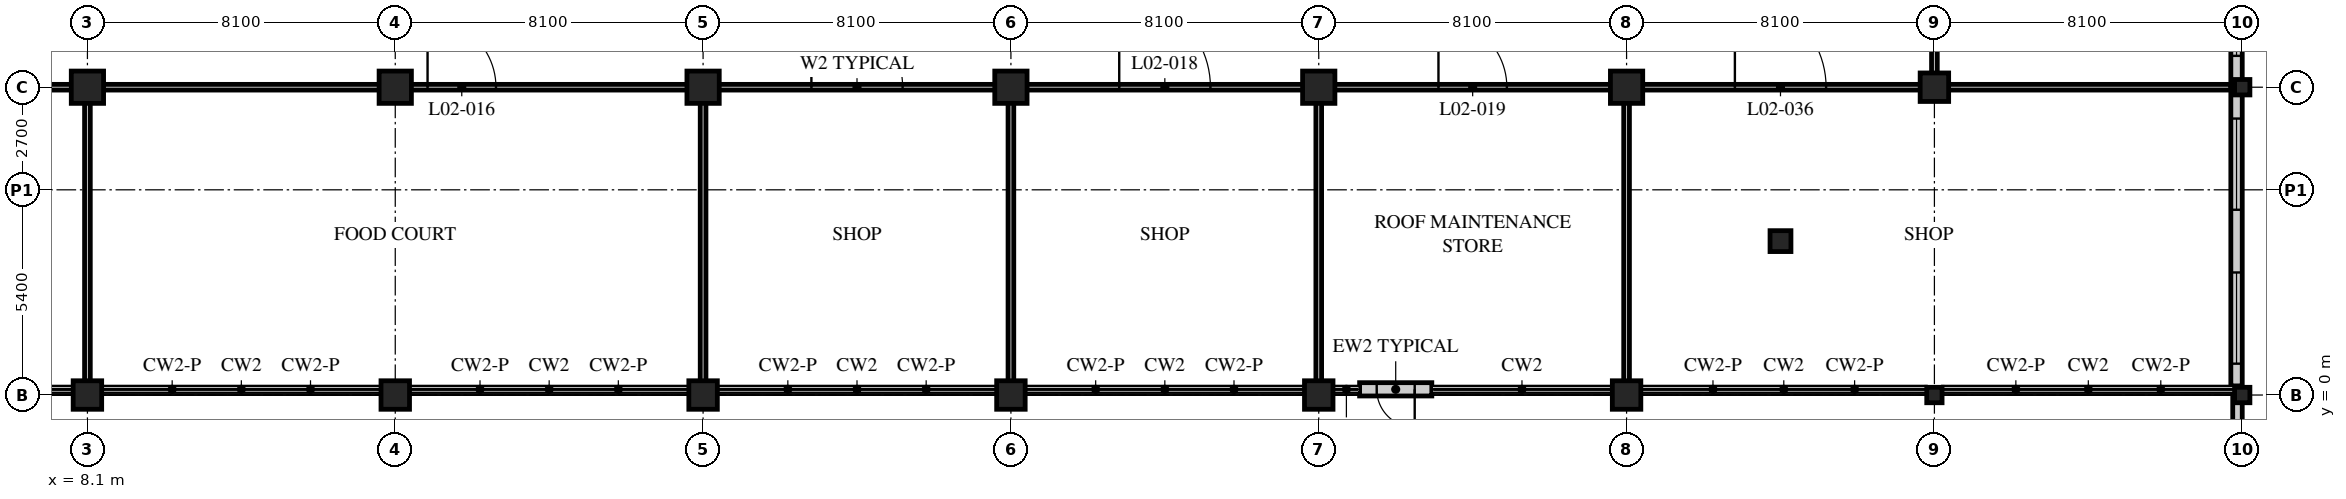
"""IFC4 building model, lengths in metres.
Left out: names, types, materials, properties, quantities, classifications, styles, units other than length and angle.
Written with IfcOpenShell. Run it as: python <this file> out.ifc"""

import sys

from ifc_helpers import new_model, si_unit, direction, frame, frame_2d, origin, origin_2d, place, context, subcontext, project, spatial, rectangle, hollow_rectangle, i_section, extrude, element, fill, save


model = new_model("IFC4")
c1 = context("Model", 3, precision=1e-05, world=origin(), true_north=direction((0.0, 1.0)))
c2 = subcontext(c1, "Body", "Model", "MODEL_VIEW")
j1 = project(units=[si_unit("LENGTHUNIT", "METRE"), si_unit("PLANEANGLEUNIT", "RADIAN")], contexts=[c1])
p1 = place(None, origin())
s1 = spatial("IfcSite", under=j1, at=p1, CompositionType="ELEMENT")
p2 = place(p1, origin())
s2 = spatial("IfcBuilding", under=s1, at=p2, CompositionType="ELEMENT")
p3 = place(p2, frame((0.0, 0.0, 11.4)))
s3 = spatial("IfcBuildingStorey", under=s2, at=p3, CompositionType="ELEMENT", Elevation=11.4)
p4 = place(p3, frame((8.1, 0.0, 0.0), z_axis=(0.0, 0.0, 1.0), x_axis=(1.0, 0.0, 0.0)))
e1 = element("IfcColumn", 1, at=p4, inside=s3, PredefinedType="COLUMN", context=c2, shape_type="SweptSolid", body=[
    extrude(hollow_rectangle(XDim=0.75, YDim=0.75, WallThickness=0.07, at=origin_2d()), origin(), (0.0, 0.0, 1.0), 5.4),
])
p5 = place(p3, frame((8.1, 8.1, 0.0), z_axis=(0.0, 0.0, 1.0), x_axis=(1.0, 0.0, 0.0)))
e2 = element("IfcColumn", 2, at=p5, inside=s3, PredefinedType="COLUMN", context=c2, shape_type="SweptSolid", body=[
    extrude(hollow_rectangle(XDim=0.85, YDim=0.85, WallThickness=0.085, at=origin_2d()), origin(), (0.0, 0.0, 1.0), 5.4),
])
p6 = place(p3, frame((16.2, 0.0, 0.0), z_axis=(0.0, 0.0, 1.0), x_axis=(1.0, 0.0, 0.0)))
e3 = element("IfcColumn", 3, at=p6, inside=s3, PredefinedType="COLUMN", context=c2, shape_type="SweptSolid", body=[
    extrude(hollow_rectangle(XDim=0.75, YDim=0.75, WallThickness=0.07, at=origin_2d()), origin(), (0.0, 0.0, 1.0), 5.4),
])
p7 = place(p3, frame((16.2, 8.1, 0.0), z_axis=(0.0, 0.0, 1.0), x_axis=(1.0, 0.0, 0.0)))
e4 = element("IfcColumn", 4, at=p7, inside=s3, PredefinedType="COLUMN", context=c2, shape_type="SweptSolid", body=[
    extrude(hollow_rectangle(XDim=0.85, YDim=0.85, WallThickness=0.085, at=origin_2d()), origin(), (0.0, 0.0, 1.0), 5.4),
])
p8 = place(p3, frame((24.3, 0.0, 0.0), z_axis=(0.0, 0.0, 1.0), x_axis=(1.0, 0.0, 0.0)))
e5 = element("IfcColumn", 5, at=p8, inside=s3, PredefinedType="COLUMN", context=c2, shape_type="SweptSolid", body=[
    extrude(hollow_rectangle(XDim=0.75, YDim=0.75, WallThickness=0.07, at=origin_2d()), origin(), (0.0, 0.0, 1.0), 5.4),
])
p9 = place(p3, frame((24.3, 8.1, 0.0), z_axis=(0.0, 0.0, 1.0), x_axis=(1.0, 0.0, 0.0)))
e6 = element("IfcColumn", 6, at=p9, inside=s3, PredefinedType="COLUMN", context=c2, shape_type="SweptSolid", body=[
    extrude(hollow_rectangle(XDim=0.85, YDim=0.85, WallThickness=0.085, at=origin_2d()), origin(), (0.0, 0.0, 1.0), 5.4),
])
p10 = place(p3, frame((32.4, 0.0, 0.0), z_axis=(0.0, 0.0, 1.0), x_axis=(1.0, 0.0, 0.0)))
e7 = element("IfcColumn", 7, at=p10, inside=s3, PredefinedType="COLUMN", context=c2, shape_type="SweptSolid", body=[
    extrude(hollow_rectangle(XDim=0.75, YDim=0.75, WallThickness=0.07, at=origin_2d()), origin(), (0.0, 0.0, 1.0), 5.4),
])
p11 = place(p3, frame((32.4, 8.1, 0.0), z_axis=(0.0, 0.0, 1.0), x_axis=(1.0, 0.0, 0.0)))
e8 = element("IfcColumn", 8, at=p11, inside=s3, PredefinedType="COLUMN", context=c2, shape_type="SweptSolid", body=[
    extrude(hollow_rectangle(XDim=0.85, YDim=0.85, WallThickness=0.085, at=origin_2d()), origin(), (0.0, 0.0, 1.0), 5.4),
])
p12 = place(p3, frame((40.5, 0.0, 0.0), z_axis=(0.0, 0.0, 1.0), x_axis=(1.0, 0.0, 0.0)))
e9 = element("IfcColumn", 9, at=p12, inside=s3, PredefinedType="COLUMN", context=c2, shape_type="SweptSolid", body=[
    extrude(hollow_rectangle(XDim=0.75, YDim=0.75, WallThickness=0.07, at=origin_2d()), origin(), (0.0, 0.0, 1.0), 5.4),
])
p13 = place(p3, frame((40.5, 8.1, 0.0), z_axis=(0.0, 0.0, 1.0), x_axis=(1.0, 0.0, 0.0)))
e10 = element("IfcColumn", 10, at=p13, inside=s3, PredefinedType="COLUMN", context=c2, shape_type="SweptSolid", body=[
    extrude(hollow_rectangle(XDim=0.85, YDim=0.85, WallThickness=0.085, at=origin_2d()), origin(), (0.0, 0.0, 1.0), 5.4),
])
p14 = place(p3, frame((48.6, 0.0, 0.0), z_axis=(0.0, 0.0, 1.0), x_axis=(1.0, 0.0, 0.0)))
e11 = element("IfcColumn", 11, at=p14, inside=s3, PredefinedType="COLUMN", context=c2, shape_type="SweptSolid", body=[
    extrude(hollow_rectangle(XDim=0.75, YDim=0.75, WallThickness=0.07, at=origin_2d()), origin(), (0.0, 0.0, 1.0), 5.4),
])
p15 = place(p3, frame((48.6, 8.1, 0.0), z_axis=(0.0, 0.0, 1.0), x_axis=(1.0, 0.0, 0.0)))
e12 = element("IfcColumn", 12, at=p15, inside=s3, PredefinedType="COLUMN", context=c2, shape_type="SweptSolid", body=[
    extrude(hollow_rectangle(XDim=0.85, YDim=0.85, WallThickness=0.085, at=origin_2d()), origin(), (0.0, 0.0, 1.0), 5.4),
])
p16 = place(p3, frame((52.65, 4.05, 0.0), z_axis=(0.0, 0.0, 1.0), x_axis=(1.0, 0.0, 0.0)))
e13 = element("IfcColumn", 13, at=p16, inside=s3, PredefinedType="COLUMN", context=c2, shape_type="SweptSolid", body=[
    extrude(hollow_rectangle(XDim=0.55, YDim=0.55, WallThickness=0.05, at=origin_2d()), origin(), (0.0, 0.0, 1.0), 5.4),
])
p17 = place(p3, frame((56.7, 0.0, 0.0), z_axis=(0.0, 0.0, 1.0), x_axis=(1.0, 0.0, 0.0)))
e14 = element("IfcColumn", 14, at=p17, inside=s3, PredefinedType="COLUMN", context=c2, shape_type="SweptSolid", body=[
    extrude(i_section(OverallWidth=0.403, OverallDepth=0.406, WebThickness=0.027, FlangeThickness=0.043, FilletRadius=0.015, at=origin_2d()), origin(), (0.0, 0.0, 1.0), 5.4),
])
p18 = place(p3, frame((56.7, 8.1, 0.0), z_axis=(0.0, 0.0, 1.0), x_axis=(1.0, 0.0, 0.0)))
e15 = element("IfcColumn", 15, at=p18, inside=s3, PredefinedType="COLUMN", context=c2, shape_type="SweptSolid", body=[
    extrude(hollow_rectangle(XDim=0.75, YDim=0.75, WallThickness=0.07, at=origin_2d()), origin(), (0.0, 0.0, 1.0), 5.4),
])
for number, where, z_axis, x_axis in (
    (16, (64.8, 0.0, 0.0), (0.0, 0.0, 1.0), (1.0, 0.0, 0.0)),
    (17, (64.8, 8.1, 0.0), (0.0, 0.0, 1.0), (1.0, 0.0, 0.0)),
):
    element("IfcColumn", number, at=place(p3, frame(where, z_axis=z_axis, x_axis=x_axis)), inside=s3, PredefinedType="COLUMN", context=c2, shape_type="SweptSolid", body=[
        extrude(i_section(OverallWidth=0.403, OverallDepth=0.406, WebThickness=0.027, FlangeThickness=0.043, FilletRadius=0.015, at=origin_2d()), origin(), (0.0, 0.0, 1.0), 5.4),
    ])
p19 = place(p3, frame((41.575, 0.15, 0.0), z_axis=(0.0, 0.0, 1.0), x_axis=(1.0, 0.0, 0.0)))
e18 = element("IfcWall", 18, at=p19, inside=s3, PredefinedType="SOLIDWALL", context=c2, shape_type="SweptSolid", body=[
    extrude(rectangle(XDim=1.9, YDim=0.35, at=frame_2d((0.95, 0.0))), origin(), (0.0, 0.0, 1.0), 5.15),
])
p20 = place(p19, frame((0.45, 0.0, 0.0)))
e19 = element("IfcOpeningElement", 19, at=p20, cuts=e18, PredefinedType="OPENING", context=c2, shape_type="SweptSolid", body=[
    extrude(rectangle(XDim=1.0, YDim=2.1, at=frame_2d((0.5, 1.05))), frame((0.0, 0.185, 0.0), z_axis=(0.0, -1.0, 0.0), x_axis=(1.0, 0.0, 0.0)), (0.0, 0.0, 1.0), 0.37),
])
p21 = place(p3, frame((64.65, 0.24, 0.0), z_axis=(0.0, 0.0, 1.0), x_axis=(0.0, 1.0, 0.0)))
e20 = element("IfcWall", 20, at=p21, inside=s3, PredefinedType="SOLIDWALL", context=c2, shape_type="SweptSolid", body=[
    extrude(rectangle(XDim=48.36, YDim=0.3, at=frame_2d((24.18, 0.0))), origin(), (0.0, 0.0, 1.0), 5.15),
])
p22 = place(p21, frame((0.585, 0.0, 1.0)))
e21 = element("IfcOpeningElement", 21, at=p22, cuts=e20, PredefinedType="OPENING", context=c2, shape_type="SweptSolid", body=[
    extrude(rectangle(XDim=2.4, YDim=2.75, at=frame_2d((1.2, 1.375))), frame((0.0, 0.16, 0.0), z_axis=(0.0, -1.0, 0.0), x_axis=(1.0, 0.0, 0.0)), (0.0, 0.0, 1.0), 0.32),
])
p23 = place(p21, frame((4.635, 0.0, 1.0)))
e22 = element("IfcOpeningElement", 22, at=p23, cuts=e20, PredefinedType="OPENING", context=c2, shape_type="SweptSolid", body=[
    extrude(rectangle(XDim=2.4, YDim=2.75, at=frame_2d((1.2, 1.375))), frame((0.0, 0.16, 0.0), z_axis=(0.0, -1.0, 0.0), x_axis=(1.0, 0.0, 0.0)), (0.0, 0.0, 1.0), 0.32),
])
p24 = place(p21, frame((8.685, 0.0, 1.0)))
e23 = element("IfcOpeningElement", 23, at=p24, cuts=e20, PredefinedType="OPENING", context=c2, shape_type="SweptSolid", body=[
    extrude(rectangle(XDim=2.4, YDim=2.75, at=frame_2d((1.2, 1.375))), frame((0.0, 0.16, 0.0), z_axis=(0.0, -1.0, 0.0), x_axis=(1.0, 0.0, 0.0)), (0.0, 0.0, 1.0), 0.32),
])
p25 = place(p21, frame((12.735, 0.0, 1.0)))
e24 = element("IfcOpeningElement", 24, at=p25, cuts=e20, PredefinedType="OPENING", context=c2, shape_type="SweptSolid", body=[
    extrude(rectangle(XDim=2.4, YDim=2.75, at=frame_2d((1.2, 1.375))), frame((0.0, 0.16, 0.0), z_axis=(0.0, -1.0, 0.0), x_axis=(1.0, 0.0, 0.0)), (0.0, 0.0, 1.0), 0.32),
])
p26 = place(p21, frame((16.785, 0.0, 1.0)))
e25 = element("IfcOpeningElement", 25, at=p26, cuts=e20, PredefinedType="OPENING", context=c2, shape_type="SweptSolid", body=[
    extrude(rectangle(XDim=2.4, YDim=2.75, at=frame_2d((1.2, 1.375))), frame((0.0, 0.16, 0.0), z_axis=(0.0, -1.0, 0.0), x_axis=(1.0, 0.0, 0.0)), (0.0, 0.0, 1.0), 0.32),
])
p27 = place(p21, frame((20.835, 0.0, 1.0)))
e26 = element("IfcOpeningElement", 26, at=p27, cuts=e20, PredefinedType="OPENING", context=c2, shape_type="SweptSolid", body=[
    extrude(rectangle(XDim=2.4, YDim=2.75, at=frame_2d((1.2, 1.375))), frame((0.0, 0.16, 0.0), z_axis=(0.0, -1.0, 0.0), x_axis=(1.0, 0.0, 0.0)), (0.0, 0.0, 1.0), 0.32),
])
p28 = place(p21, frame((24.885, 0.0, 1.0)))
e27 = element("IfcOpeningElement", 27, at=p28, cuts=e20, PredefinedType="OPENING", context=c2, shape_type="SweptSolid", body=[
    extrude(rectangle(XDim=2.4, YDim=2.75, at=frame_2d((1.2, 1.375))), frame((0.0, 0.16, 0.0), z_axis=(0.0, -1.0, 0.0), x_axis=(1.0, 0.0, 0.0)), (0.0, 0.0, 1.0), 0.32),
])
p29 = place(p21, frame((28.935, 0.0, 1.0)))
e28 = element("IfcOpeningElement", 28, at=p29, cuts=e20, PredefinedType="OPENING", context=c2, shape_type="SweptSolid", body=[
    extrude(rectangle(XDim=2.4, YDim=2.75, at=frame_2d((1.2, 1.375))), frame((0.0, 0.16, 0.0), z_axis=(0.0, -1.0, 0.0), x_axis=(1.0, 0.0, 0.0)), (0.0, 0.0, 1.0), 0.32),
])
p30 = place(p21, frame((32.985, 0.0, 1.0)))
e29 = element("IfcOpeningElement", 29, at=p30, cuts=e20, PredefinedType="OPENING", context=c2, shape_type="SweptSolid", body=[
    extrude(rectangle(XDim=2.4, YDim=2.75, at=frame_2d((1.2, 1.375))), frame((0.0, 0.16, 0.0), z_axis=(0.0, -1.0, 0.0), x_axis=(1.0, 0.0, 0.0)), (0.0, 0.0, 1.0), 0.32),
])
p31 = place(p21, frame((37.035, 0.0, 1.0)))
e30 = element("IfcOpeningElement", 30, at=p31, cuts=e20, PredefinedType="OPENING", context=c2, shape_type="SweptSolid", body=[
    extrude(rectangle(XDim=2.4, YDim=2.75, at=frame_2d((1.2, 1.375))), frame((0.0, 0.16, 0.0), z_axis=(0.0, -1.0, 0.0), x_axis=(1.0, 0.0, 0.0)), (0.0, 0.0, 1.0), 0.32),
])
p32 = place(p21, frame((41.085, 0.0, 1.0)))
e31 = element("IfcOpeningElement", 31, at=p32, cuts=e20, PredefinedType="OPENING", context=c2, shape_type="SweptSolid", body=[
    extrude(rectangle(XDim=2.4, YDim=2.75, at=frame_2d((1.2, 1.375))), frame((0.0, 0.16, 0.0), z_axis=(0.0, -1.0, 0.0), x_axis=(1.0, 0.0, 0.0)), (0.0, 0.0, 1.0), 0.32),
])
p33 = place(p21, frame((45.135, 0.0, 1.0)))
e32 = element("IfcOpeningElement", 32, at=p33, cuts=e20, PredefinedType="OPENING", context=c2, shape_type="SweptSolid", body=[
    extrude(rectangle(XDim=2.4, YDim=2.75, at=frame_2d((1.2, 1.375))), frame((0.0, 0.16, 0.0), z_axis=(0.0, -1.0, 0.0), x_axis=(1.0, 0.0, 0.0)), (0.0, 0.0, 1.0), 0.32),
])
p34 = place(p3, frame((64.675, -7.85, 0.0), z_axis=(0.0, 0.0, 1.0), x_axis=(0.0, 1.0, 0.0)))
e33 = element("IfcWall", 33, at=p34, inside=s3, PredefinedType="PARAPET", context=c2, shape_type="SweptSolid", body=[
    extrude(rectangle(XDim=7.85, YDim=0.25, at=frame_2d((3.925, 0.0))), origin(), (0.0, 0.0, 1.0), 1.38),
])
p35 = place(p3, frame((0.0, 8.1, 0.0), z_axis=(0.0, 0.0, 1.0), x_axis=(1.0, 0.0, 0.0)))
e34 = element("IfcWall", 34, at=p35, inside=s3, PredefinedType="PARTITIONING", context=c2, shape_type="SweptSolid", body=[
    extrude(rectangle(XDim=56.7, YDim=0.15, at=frame_2d((28.35, 0.0))), origin(), (0.0, 0.0, 1.0), 4.538),
])
p36 = place(p35, frame((17.05, 0.0, 0.0)))
e35 = element("IfcOpeningElement", 35, at=p36, cuts=e34, PredefinedType="OPENING", context=c2, shape_type="SweptSolid", body=[
    extrude(rectangle(XDim=1.8, YDim=2.4, at=frame_2d((0.9, 1.2))), frame((0.0, 0.085, 0.0), z_axis=(0.0, -1.0, 0.0), x_axis=(1.0, 0.0, 0.0)), (0.0, 0.0, 1.0), 0.17),
])
p37 = place(p35, frame((27.15, 0.0, 0.0)))
e36 = element("IfcOpeningElement", 36, at=p37, cuts=e34, PredefinedType="OPENING", context=c2, shape_type="SweptSolid", body=[
    extrude(rectangle(XDim=2.4, YDim=2.7, at=frame_2d((1.2, 1.35))), frame((0.0, 0.085, 0.0), z_axis=(0.0, -1.0, 0.0), x_axis=(1.0, 0.0, 0.0)), (0.0, 0.0, 1.0), 0.17),
])
p38 = place(p35, frame((35.25, 0.0, 0.0)))
e37 = element("IfcOpeningElement", 37, at=p38, cuts=e34, PredefinedType="OPENING", context=c2, shape_type="SweptSolid", body=[
    extrude(rectangle(XDim=2.4, YDim=2.7, at=frame_2d((1.2, 1.35))), frame((0.0, 0.085, 0.0), z_axis=(0.0, -1.0, 0.0), x_axis=(1.0, 0.0, 0.0)), (0.0, 0.0, 1.0), 0.17),
])
p39 = place(p35, frame((43.65, 0.0, 0.0)))
e38 = element("IfcOpeningElement", 38, at=p39, cuts=e34, PredefinedType="OPENING", context=c2, shape_type="SweptSolid", body=[
    extrude(rectangle(XDim=1.8, YDim=2.4, at=frame_2d((0.9, 1.2))), frame((0.0, 0.085, 0.0), z_axis=(0.0, -1.0, 0.0), x_axis=(1.0, 0.0, 0.0)), (0.0, 0.0, 1.0), 0.17),
])
p40 = place(p35, frame((2.85, 0.0, 0.0)))
e39 = element("IfcOpeningElement", 39, at=p40, cuts=e34, PredefinedType="OPENING", context=c2, shape_type="SweptSolid", body=[
    extrude(rectangle(XDim=2.4, YDim=2.7, at=frame_2d((1.2, 1.35))), frame((0.0, 0.085, 0.0), z_axis=(0.0, -1.0, 0.0), x_axis=(1.0, 0.0, 0.0)), (0.0, 0.0, 1.0), 0.17),
])
p41 = place(p35, frame((51.45, 0.0, 0.0)))
e40 = element("IfcOpeningElement", 40, at=p41, cuts=e34, PredefinedType="OPENING", context=c2, shape_type="SweptSolid", body=[
    extrude(rectangle(XDim=2.4, YDim=2.7, at=frame_2d((1.2, 1.35))), frame((0.0, 0.085, 0.0), z_axis=(0.0, -1.0, 0.0), x_axis=(1.0, 0.0, 0.0)), (0.0, 0.0, 1.0), 0.17),
])
p42 = place(p3, frame((56.7, 8.1, 0.0), z_axis=(0.0, 0.0, 1.0), x_axis=(0.0, 1.0, 0.0)))
e41 = element("IfcWall", 41, at=p42, inside=s3, PredefinedType="PARTITIONING", context=c2, shape_type="SweptSolid", body=[
    extrude(rectangle(XDim=36.0, YDim=0.15, at=frame_2d((18.0, 0.0))), origin(), (0.0, 0.0, 1.0), 4.538),
])
p43 = place(p42, frame((2.85, 0.0, 0.0)))
e42 = element("IfcOpeningElement", 42, at=p43, cuts=e41, PredefinedType="OPENING", context=c2, shape_type="SweptSolid", body=[
    extrude(rectangle(XDim=2.4, YDim=2.7, at=frame_2d((1.2, 1.35))), frame((0.0, 0.085, 0.0), z_axis=(0.0, -1.0, 0.0), x_axis=(1.0, 0.0, 0.0)), (0.0, 0.0, 1.0), 0.17),
])
p44 = place(p42, frame((10.95, 0.0, 0.0)))
e43 = element("IfcOpeningElement", 43, at=p44, cuts=e41, PredefinedType="OPENING", context=c2, shape_type="SweptSolid", body=[
    extrude(rectangle(XDim=2.4, YDim=2.7, at=frame_2d((1.2, 1.35))), frame((0.0, 0.085, 0.0), z_axis=(0.0, -1.0, 0.0), x_axis=(1.0, 0.0, 0.0)), (0.0, 0.0, 1.0), 0.17),
])
p45 = place(p42, frame((19.05, 0.0, 0.0)))
e44 = element("IfcOpeningElement", 44, at=p45, cuts=e41, PredefinedType="OPENING", context=c2, shape_type="SweptSolid", body=[
    extrude(rectangle(XDim=2.4, YDim=2.7, at=frame_2d((1.2, 1.35))), frame((0.0, 0.085, 0.0), z_axis=(0.0, -1.0, 0.0), x_axis=(1.0, 0.0, 0.0)), (0.0, 0.0, 1.0), 0.17),
])
p46 = place(p42, frame((27.15, 0.0, 0.0)))
e45 = element("IfcOpeningElement", 45, at=p46, cuts=e41, PredefinedType="OPENING", context=c2, shape_type="SweptSolid", body=[
    extrude(rectangle(XDim=2.4, YDim=2.7, at=frame_2d((1.2, 1.35))), frame((0.0, 0.085, 0.0), z_axis=(0.0, -1.0, 0.0), x_axis=(1.0, 0.0, 0.0)), (0.0, 0.0, 1.0), 0.17),
])
p47 = place(p42, frame((33.225, 0.0, 0.0)))
e46 = element("IfcOpeningElement", 46, at=p47, cuts=e41, PredefinedType="OPENING", context=c2, shape_type="SweptSolid", body=[
    extrude(rectangle(XDim=2.4, YDim=2.7, at=frame_2d((1.2, 1.35))), frame((0.0, 0.085, 0.0), z_axis=(0.0, -1.0, 0.0), x_axis=(1.0, 0.0, 0.0)), (0.0, 0.0, 1.0), 0.17),
])
for number, where, z_axis, x_axis in (
    (47, (24.3, 8.1, 0.0), (0.0, 0.0, 1.0), (0.0, -1.0, 0.0)),
    (48, (32.4, 8.1, 0.0), (0.0, 0.0, 1.0), (0.0, -1.0, 0.0)),
    (49, (40.5, 8.1, 0.0), (0.0, 0.0, 1.0), (0.0, -1.0, 0.0)),
    (50, (8.1, 8.1, 0.0), (0.0, 0.0, 1.0), (0.0, -1.0, 0.0)),
    (51, (56.7, 8.1, 0.0), (0.0, 0.0, 1.0), (1.0, 0.0, 0.0)),
    (52, (48.6, 8.1, 0.0), (0.0, 0.0, 1.0), (0.0, -1.0, 0.0)),
):
    element("IfcWall", number, at=place(p3, frame(where, z_axis=z_axis, x_axis=x_axis)), inside=s3, PredefinedType="PARTITIONING", context=c2, shape_type="SweptSolid", body=[
        extrude(rectangle(XDim=7.8, YDim=0.15, at=frame_2d((3.9, 0.0))), origin(), (0.0, 0.0, 1.0), 4.538),
    ])
p48 = place(p20, origin())
e53 = element("IfcDoor", 53, at=p48, inside=s3, OperationType="SINGLE_SWING_LEFT", PredefinedType="DOOR", context=c2, shape_type="SweptSolid", body=[
    extrude(rectangle(XDim=1.0, YDim=2.1, at=frame_2d((0.5, 1.05))), frame((0.0, 0.025, 0.0), z_axis=(0.0, -1.0, 0.0), x_axis=(1.0, 0.0, 0.0)), (0.0, 0.0, 1.0), 0.05),
])
fill(e19, e53)
p49 = place(p22, origin())
e54 = element("IfcWindow", 54, at=p49, inside=s3, PartitioningType="SINGLE_PANEL", PredefinedType="WINDOW", context=c2, shape_type="SweptSolid", body=[
    extrude(rectangle(XDim=2.4, YDim=2.75, at=frame_2d((1.2, 1.375))), frame((0.0, 0.03, 0.0), z_axis=(0.0, -1.0, 0.0), x_axis=(1.0, 0.0, 0.0)), (0.0, 0.0, 1.0), 0.06),
])
fill(e21, e54)
p50 = place(p23, origin())
e55 = element("IfcWindow", 55, at=p50, inside=s3, PartitioningType="SINGLE_PANEL", PredefinedType="WINDOW", context=c2, shape_type="SweptSolid", body=[
    extrude(rectangle(XDim=2.4, YDim=2.75, at=frame_2d((1.2, 1.375))), frame((0.0, 0.03, 0.0), z_axis=(0.0, -1.0, 0.0), x_axis=(1.0, 0.0, 0.0)), (0.0, 0.0, 1.0), 0.06),
])
fill(e22, e55)
p51 = place(p24, origin())
e56 = element("IfcWindow", 56, at=p51, inside=s3, PartitioningType="SINGLE_PANEL", PredefinedType="WINDOW", context=c2, shape_type="SweptSolid", body=[
    extrude(rectangle(XDim=2.4, YDim=2.75, at=frame_2d((1.2, 1.375))), frame((0.0, 0.03, 0.0), z_axis=(0.0, -1.0, 0.0), x_axis=(1.0, 0.0, 0.0)), (0.0, 0.0, 1.0), 0.06),
])
fill(e23, e56)
p52 = place(p36, origin())
e57 = element("IfcDoor", 57, at=p52, inside=s3, OperationType="DOUBLE_DOOR_SINGLE_SWING", PredefinedType="DOOR", context=c2, shape_type="SweptSolid", body=[
    extrude(rectangle(XDim=1.8, YDim=2.4, at=frame_2d((0.9, 1.2))), frame((0.0, 0.025, 0.0), z_axis=(0.0, -1.0, 0.0), x_axis=(1.0, 0.0, 0.0)), (0.0, 0.0, 1.0), 0.05),
])
fill(e35, e57)
p53 = place(p37, origin())
e58 = element("IfcDoor", 58, at=p53, inside=s3, OperationType="DOUBLE_DOOR_SINGLE_SWING", PredefinedType="DOOR", context=c2, shape_type="SweptSolid", body=[
    extrude(rectangle(XDim=2.4, YDim=2.7, at=frame_2d((1.2, 1.35))), frame((0.0, 0.025, 0.0), z_axis=(0.0, -1.0, 0.0), x_axis=(1.0, 0.0, 0.0)), (0.0, 0.0, 1.0), 0.05),
])
fill(e36, e58)
p54 = place(p38, origin())
e59 = element("IfcDoor", 59, at=p54, inside=s3, OperationType="DOUBLE_DOOR_SINGLE_SWING", PredefinedType="DOOR", context=c2, shape_type="SweptSolid", body=[
    extrude(rectangle(XDim=2.4, YDim=2.7, at=frame_2d((1.2, 1.35))), frame((0.0, 0.025, 0.0), z_axis=(0.0, -1.0, 0.0), x_axis=(1.0, 0.0, 0.0)), (0.0, 0.0, 1.0), 0.05),
])
fill(e37, e59)
p55 = place(p39, origin())
e60 = element("IfcDoor", 60, at=p55, inside=s3, OperationType="DOUBLE_DOOR_SINGLE_SWING", PredefinedType="DOOR", context=c2, shape_type="SweptSolid", body=[
    extrude(rectangle(XDim=1.8, YDim=2.4, at=frame_2d((0.9, 1.2))), frame((0.0, 0.025, 0.0), z_axis=(0.0, -1.0, 0.0), x_axis=(1.0, 0.0, 0.0)), (0.0, 0.0, 1.0), 0.05),
])
fill(e38, e60)
p56 = place(p41, origin())
e61 = element("IfcDoor", 61, at=p56, inside=s3, OperationType="DOUBLE_DOOR_SINGLE_SWING", PredefinedType="DOOR", context=c2, shape_type="SweptSolid", body=[
    extrude(rectangle(XDim=2.4, YDim=2.7, at=frame_2d((1.2, 1.35))), frame((0.0, 0.025, 0.0), z_axis=(0.0, -1.0, 0.0), x_axis=(1.0, 0.0, 0.0)), (0.0, 0.0, 1.0), 0.05),
])
fill(e40, e61)
save(model, sys.argv[1])
